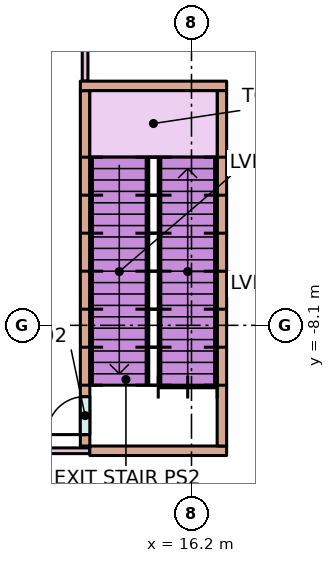
"""IFC4 building model, lengths in metres.
Left out: names, types, materials, properties, quantities, classifications, styles, units other than length and angle.
Written with IfcOpenShell. Run it as: python <this file> out.ifc"""

import sys

from ifc_helpers import new_model, si_unit, direction, frame, frame_2d, origin, place, context, subcontext, project, spatial, rectangle, extrude, element, fill, save


model = new_model("IFC4")
c1 = context("Model", 3, precision=1e-05, world=origin(), true_north=direction((0.0, 1.0)))
c2 = subcontext(c1, "Body", "Model", "MODEL_VIEW")
j1 = project(units=[si_unit("LENGTHUNIT", "METRE"), si_unit("PLANEANGLEUNIT", "RADIAN")], contexts=[c1])
p1 = place(None, origin())
s1 = spatial("IfcSite", under=j1, at=p1, CompositionType="ELEMENT")
p2 = place(p1, origin())
s2 = spatial("IfcBuilding", under=s1, at=p2, CompositionType="ELEMENT")
p3 = place(p2, frame((0.0, 0.0, 6.0)))
s3 = spatial("IfcBuildingStorey", under=s2, at=p3, CompositionType="ELEMENT", Elevation=6.0)
p4 = place(p3, frame((13.4, -11.275, 0.0), z_axis=(0.0, 0.0, 1.0), x_axis=(0.0, 1.0, 0.0)))
e1 = element("IfcWall", 1, at=p4, inside=s3, PredefinedType="STANDARD", context=c2, shape_type="SweptSolid", body=[
    extrude(rectangle(XDim=9.35, YDim=0.25, at=frame_2d((4.675, 0.0))), origin(), (0.0, 0.0, 1.0), 6.68),
])
p5 = place(p4, frame((0.3, 0.0, 0.0)))
e2 = element("IfcOpeningElement", 2, at=p5, cuts=e1, PredefinedType="OPENING", context=c2, shape_type="SweptSolid", body=[
    extrude(rectangle(XDim=1.0, YDim=2.1, at=frame_2d((0.5, 1.05))), frame((0.0, 0.135, 0.0), z_axis=(0.0, -1.0, 0.0), x_axis=(1.0, 0.0, 0.0)), (0.0, 0.0, 1.0), 0.27),
])
p6 = place(p3, frame((13.525, -11.4, 0.0), z_axis=(0.0, 0.0, 1.0), x_axis=(1.0, 0.0, 0.0)))
e3 = element("IfcWall", 3, at=p6, inside=s3, PredefinedType="STANDARD", context=c2, shape_type="SweptSolid", body=[
    extrude(rectangle(XDim=3.6, YDim=0.25, at=frame_2d((1.8, 0.0))), origin(), (0.0, 0.0, 1.0), 6.68),
])
p7 = place(p3, frame((13.275, -1.8, 0.0), z_axis=(0.0, 0.0, 1.0), x_axis=(1.0, 0.0, 0.0)))
e4 = element("IfcWall", 4, at=p7, inside=s3, PredefinedType="STANDARD", context=c2, shape_type="SweptSolid", body=[
    extrude(rectangle(XDim=3.85, YDim=0.25, at=frame_2d((1.925, 0.0))), origin(), (0.0, 0.0, 1.0), 6.68),
])
p8 = place(p3, frame((17.0, -11.275, 0.0), z_axis=(0.0, 0.0, 1.0), x_axis=(0.0, 1.0, 0.0)))
e5 = element("IfcWall", 5, at=p8, inside=s3, PredefinedType="STANDARD", context=c2, shape_type="SweptSolid", body=[
    extrude(rectangle(XDim=9.35, YDim=0.25, at=frame_2d((4.675, 0.0))), origin(), (0.0, 0.0, 1.0), 6.68),
])
p9 = place(p3, frame((-2.525, -11.4, 0.0), z_axis=(0.0, 0.0, 1.0), x_axis=(1.0, 0.0, 0.0)))
e6 = element("IfcWall", 6, at=p9, inside=s3, PredefinedType="PARTITIONING", context=c2, shape_type="SweptSolid", body=[
    extrude(rectangle(XDim=16.05, YDim=0.15, at=frame_2d((8.025, 0.0))), origin(), (0.0, 0.0, 1.0), 6.68),
])
p10 = place(p3, frame((13.4, -1.675, 0.0), z_axis=(0.0, 0.0, 1.0), x_axis=(0.0, 1.0, 0.0)))
e7 = element("IfcWall", 7, at=p10, inside=s3, PredefinedType="PARTITIONING", context=c2, shape_type="SweptSolid", body=[
    extrude(rectangle(XDim=4.05, YDim=0.15, at=frame_2d((2.025, 0.0))), origin(), (0.0, 0.0, 1.0), 6.68),
])
p11 = place(p5, origin())
e8 = element("IfcDoor", 8, at=p11, inside=s3, OperationType="SINGLE_SWING_LEFT", PredefinedType="DOOR", context=c2, shape_type="SweptSolid", body=[
    extrude(rectangle(XDim=1.0, YDim=2.1, at=frame_2d((0.5, 1.05))), frame((0.0, 0.025, 0.0), z_axis=(0.0, -1.0, 0.0), x_axis=(1.0, 0.0, 0.0)), (0.0, 0.0, 1.0), 0.05),
])
fill(e2, e8)
save(model, sys.argv[1])
